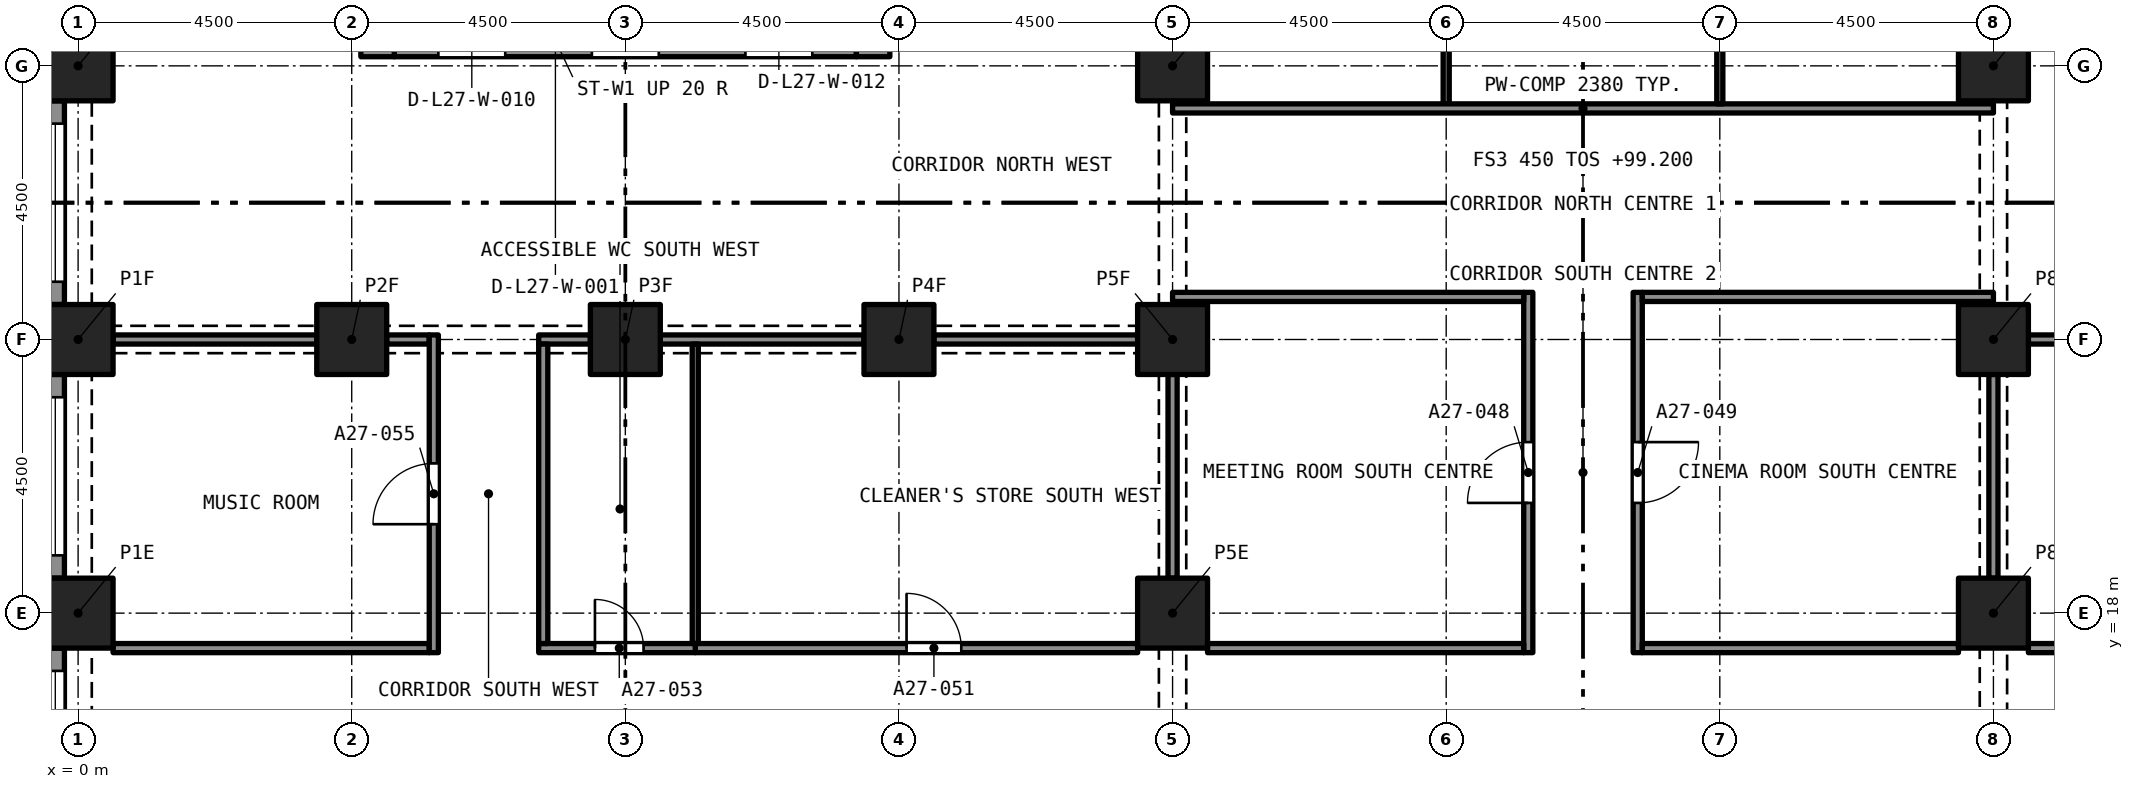
"""IFC4 building model, lengths in metres.
Left out: names, types, materials, properties, quantities, classifications, styles, units other than length and angle.
Written with IfcOpenShell. Run it as: python <this file> out.ifc"""

import sys

from ifc_helpers import new_model, si_unit, direction, frame, frame_2d, origin, origin_2d, place, context, subcontext, project, spatial, rectangle, extrude, element, fill, save


model = new_model("IFC4")
c1 = context("Model", 3, precision=1e-05, world=origin(), true_north=direction((0.0, 1.0)))
c2 = subcontext(c1, "Body", "Model", "MODEL_VIEW")
j1 = project(units=[si_unit("LENGTHUNIT", "METRE"), si_unit("PLANEANGLEUNIT", "RADIAN")], contexts=[c1])
p1 = place(None, origin())
s1 = spatial("IfcSite", under=j1, at=p1, CompositionType="ELEMENT")
p2 = place(p1, origin())
s2 = spatial("IfcBuilding", under=s1, at=p2, CompositionType="ELEMENT")
p3 = place(p2, frame((0.0, 0.0, 99.2)))
s3 = spatial("IfcBuildingStorey", under=s2, at=p3, CompositionType="ELEMENT", Elevation=99.2)
for number, where, z_axis, x_axis in (
    (1, (0.0, 18.0, 0.0), (0.0, 0.0, 1.0), (1.0, 0.0, 0.0)),
    (2, (18.0, 18.0, 0.0), (0.0, 0.0, 1.0), (1.0, 0.0, 0.0)),
    (3, (31.5, 18.0, 0.0), (0.0, 0.0, 1.0), (1.0, 0.0, 0.0)),
    (4, (0.0, 22.5, 0.0), (0.0, 0.0, 1.0), (1.0, 0.0, 0.0)),
    (5, (4.5, 22.5, 0.0), (0.0, 0.0, 1.0), (1.0, 0.0, 0.0)),
    (6, (9.0, 22.5, 0.0), (0.0, 0.0, 1.0), (1.0, 0.0, 0.0)),
    (7, (13.5, 22.5, 0.0), (0.0, 0.0, 1.0), (1.0, 0.0, 0.0)),
    (8, (18.0, 22.5, 0.0), (0.0, 0.0, 1.0), (1.0, 0.0, 0.0)),
    (9, (31.5, 22.5, 0.0), (0.0, 0.0, 1.0), (1.0, 0.0, 0.0)),
    (10, (0.0, 27.0, 0.0), (0.0, 0.0, 1.0), (1.0, 0.0, 0.0)),
    (11, (18.0, 27.0, 0.0), (0.0, 0.0, 1.0), (1.0, 0.0, 0.0)),
    (12, (31.5, 27.0, 0.0), (0.0, 0.0, 1.0), (1.0, 0.0, 0.0)),
):
    element("IfcColumn", number, at=place(p3, frame(where, z_axis=z_axis, x_axis=x_axis)), inside=s3, PredefinedType="COLUMN", context=c2, shape_type="SweptSolid", body=[
        extrude(rectangle(XDim=1.15, YDim=1.15, at=origin_2d()), origin(), (0.0, 0.0, 1.0), 3.2),
    ])
p4 = place(p3, frame((5.2, 27.425, 0.0), z_axis=(0.0, 0.0, 1.0), x_axis=(1.0, 0.0, 0.0)))
e13 = element("IfcWall", 13, at=p4, inside=s3, PredefinedType="SOLIDWALL", context=c2, shape_type="SweptSolid", body=[
    extrude(rectangle(XDim=7.6, YDim=0.55, at=frame_2d((3.8, 0.0))), origin(), (0.0, 0.0, 1.0), 3.2),
])
p5 = place(p4, frame((0.725, 0.0, 0.0)))
e14 = element("IfcOpeningElement", 14, at=p5, cuts=e13, PredefinedType="OPENING", context=c2, shape_type="SweptSolid", body=[
    extrude(rectangle(XDim=1.1, YDim=2.1, at=frame_2d((0.55, 1.05))), frame((0.0, 0.285, 0.0), z_axis=(0.0, -1.0, 0.0), x_axis=(1.0, 0.0, 0.0)), (0.0, 0.0, 1.0), 0.57),
])
p6 = place(p4, frame((3.25, 0.0, 0.0)))
e15 = element("IfcOpeningElement", 15, at=p6, cuts=e13, PredefinedType="OPENING", context=c2, shape_type="SweptSolid", body=[
    extrude(rectangle(XDim=1.1, YDim=2.1, at=frame_2d((0.55, 1.05))), frame((0.0, 0.285, 0.0), z_axis=(0.0, -1.0, 0.0), x_axis=(1.0, 0.0, 0.0)), (0.0, 0.0, 1.0), 0.57),
])
p7 = place(p4, frame((5.775, 0.0, 0.0)))
e16 = element("IfcOpeningElement", 16, at=p7, cuts=e13, PredefinedType="OPENING", context=c2, shape_type="SweptSolid", body=[
    extrude(rectangle(XDim=1.1, YDim=2.1, at=frame_2d((0.55, 1.05))), frame((0.0, 0.285, 0.0), z_axis=(0.0, -1.0, 0.0), x_axis=(1.0, 0.0, 0.0)), (0.0, 0.0, 1.0), 0.57),
])
p8 = place(p3, frame((4.925, 27.15, 0.0), z_axis=(0.0, 0.0, 1.0), x_axis=(0.0, 1.0, 0.0)))
e17 = element("IfcWall", 17, at=p8, inside=s3, PredefinedType="SOLIDWALL", context=c2, shape_type="SweptSolid", body=[
    extrude(rectangle(XDim=13.2, YDim=0.55, at=frame_2d((6.6, 0.0))), origin(), (0.0, 0.0, 1.0), 3.2),
])
p9 = place(p8, frame((8.8, 0.0, 0.0)))
e18 = element("IfcOpeningElement", 18, at=p9, cuts=e17, PredefinedType="OPENING", context=c2, shape_type="SweptSolid", body=[
    extrude(rectangle(XDim=1.2, YDim=2.1, at=frame_2d((0.6, 1.05))), frame((0.0, 0.285, 0.0), z_axis=(0.0, -1.0, 0.0), x_axis=(1.0, 0.0, 0.0)), (0.0, 0.0, 1.0), 0.57),
])
p10 = place(p3, frame((13.075, 27.15, 0.0), z_axis=(0.0, 0.0, 1.0), x_axis=(0.0, 1.0, 0.0)))
e19 = element("IfcWall", 19, at=p10, inside=s3, PredefinedType="SOLIDWALL", context=c2, shape_type="SweptSolid", body=[
    extrude(rectangle(XDim=13.2, YDim=0.55, at=frame_2d((6.6, 0.0))), origin(), (0.0, 0.0, 1.0), 3.2),
])
p11 = place(p10, frame((10.95, 0.0, 0.0)))
e20 = element("IfcOpeningElement", 20, at=p11, cuts=e19, PredefinedType="OPENING", context=c2, shape_type="SweptSolid", body=[
    extrude(rectangle(XDim=1.1, YDim=2.1, at=frame_2d((0.55, 1.05))), frame((0.0, 0.285, 0.0), z_axis=(0.0, -1.0, 0.0), x_axis=(1.0, 0.0, 0.0)), (0.0, 0.0, 1.0), 0.57),
])
p12 = place(p10, frame((8.8, 0.0, 0.0)))
e21 = element("IfcOpeningElement", 21, at=p12, cuts=e19, PredefinedType="OPENING", context=c2, shape_type="SweptSolid", body=[
    extrude(rectangle(XDim=1.2, YDim=2.1, at=frame_2d((0.6, 1.05))), frame((0.0, 0.285, 0.0), z_axis=(0.0, -1.0, 0.0), x_axis=(1.0, 0.0, 0.0)), (0.0, 0.0, 1.0), 0.57),
])
p13 = place(p3, frame((-0.375, 23.075, 0.0), z_axis=(0.0, 0.0, 1.0), x_axis=(0.0, 1.0, 0.0)))
e22 = element("IfcWall", 22, at=p13, inside=s3, PredefinedType="SOLIDWALL", context=c2, shape_type="SweptSolid", body=[
    extrude(rectangle(XDim=3.35, YDim=0.3, at=frame_2d((1.675, 0.0))), origin(), (0.0, 0.0, 1.0), 3.2),
])
p14 = place(p13, frame((0.375, 0.0, 0.45)))
e23 = element("IfcOpeningElement", 23, at=p14, cuts=e22, PredefinedType="OPENING", context=c2, shape_type="SweptSolid", body=[
    extrude(rectangle(XDim=2.6, YDim=1.95, at=frame_2d((1.3, 0.975))), frame((0.0, 0.16, 0.0), z_axis=(0.0, -1.0, 0.0), x_axis=(1.0, 0.0, 0.0)), (0.0, 0.0, 1.0), 0.32),
])
p15 = place(p3, frame((-0.375, 18.575, 0.0), z_axis=(0.0, 0.0, 1.0), x_axis=(0.0, 1.0, 0.0)))
e24 = element("IfcWall", 24, at=p15, inside=s3, PredefinedType="SOLIDWALL", context=c2, shape_type="SweptSolid", body=[
    extrude(rectangle(XDim=3.35, YDim=0.3, at=frame_2d((1.675, 0.0))), origin(), (0.0, 0.0, 1.0), 3.2),
])
p16 = place(p15, frame((0.375, 0.0, 0.45)))
e25 = element("IfcOpeningElement", 25, at=p16, cuts=e24, PredefinedType="OPENING", context=c2, shape_type="SweptSolid", body=[
    extrude(rectangle(XDim=2.6, YDim=1.95, at=frame_2d((1.3, 0.975))), frame((0.0, 0.16, 0.0), z_axis=(0.0, -1.0, 0.0), x_axis=(1.0, 0.0, 0.0)), (0.0, 0.0, 1.0), 0.32),
])
p17 = place(p3, frame((-0.375, 14.075, 0.0), z_axis=(0.0, 0.0, 1.0), x_axis=(0.0, 1.0, 0.0)))
e26 = element("IfcWall", 26, at=p17, inside=s3, PredefinedType="SOLIDWALL", context=c2, shape_type="SweptSolid", body=[
    extrude(rectangle(XDim=3.35, YDim=0.3, at=frame_2d((1.675, 0.0))), origin(), (0.0, 0.0, 1.0), 3.2),
])
p18 = place(p17, frame((0.375, 0.0, 0.45)))
e27 = element("IfcOpeningElement", 27, at=p18, cuts=e26, PredefinedType="OPENING", context=c2, shape_type="SweptSolid", body=[
    extrude(rectangle(XDim=2.6, YDim=1.95, at=frame_2d((1.3, 0.975))), frame((0.0, 0.16, 0.0), z_axis=(0.0, -1.0, 0.0), x_axis=(1.0, 0.0, 0.0)), (0.0, 0.0, 1.0), 0.32),
])
p19 = place(p3, frame((23.85, 17.35, 0.0), z_axis=(0.0, 0.0, 1.0), x_axis=(0.0, 1.0, 0.0)))
e28 = element("IfcWall", 28, at=p19, inside=s3, PredefinedType="PARTITIONING", context=c2, shape_type="SweptSolid", body=[
    extrude(rectangle(XDim=5.925, YDim=0.15, at=frame_2d((2.962, 0.0))), origin(), (0.0, 0.0, 1.0), 2.75),
])
p20 = place(p19, frame((2.462, 0.0, 0.0)))
e29 = element("IfcOpeningElement", 29, at=p20, cuts=e28, PredefinedType="OPENING", context=c2, shape_type="SweptSolid", body=[
    extrude(rectangle(XDim=1.0, YDim=2.1, at=frame_2d((0.5, 1.05))), frame((0.0, 0.085, 0.0), z_axis=(0.0, -1.0, 0.0), x_axis=(1.0, 0.0, 0.0)), (0.0, 0.0, 1.0), 0.17),
])
p21 = place(p3, frame((25.65, 23.275, 0.0), z_axis=(0.0, 0.0, 1.0), x_axis=(0.0, -1.0, 0.0)))
e30 = element("IfcWall", 30, at=p21, inside=s3, PredefinedType="PARTITIONING", context=c2, shape_type="SweptSolid", body=[
    extrude(rectangle(XDim=5.925, YDim=0.15, at=frame_2d((2.962, 0.0))), origin(), (0.0, 0.0, 1.0), 2.75),
])
p22 = place(p21, frame((2.462, 0.0, 0.0)))
e31 = element("IfcOpeningElement", 31, at=p22, cuts=e30, PredefinedType="OPENING", context=c2, shape_type="SweptSolid", body=[
    extrude(rectangle(XDim=1.0, YDim=2.1, at=frame_2d((0.5, 1.05))), frame((0.0, 0.085, 0.0), z_axis=(0.0, -1.0, 0.0), x_axis=(1.0, 0.0, 0.0)), (0.0, 0.0, 1.0), 0.17),
])
for number, where, z_axis, x_axis in (
    (32, (18.575, 17.425, 0.0), (0.0, 0.0, 1.0), (1.0, 0.0, 0.0)),
    (33, (25.725, 17.425, 0.0), (0.0, 0.0, 1.0), (1.0, 0.0, 0.0)),
):
    element("IfcWall", number, at=place(p3, frame(where, z_axis=z_axis, x_axis=x_axis)), inside=s3, PredefinedType="PARTITIONING", context=c2, shape_type="SweptSolid", body=[
        extrude(rectangle(XDim=5.2, YDim=0.15, at=frame_2d((2.6, 0.0))), origin(), (0.0, 0.0, 1.0), 2.75),
    ])
p23 = place(p3, frame((32.075, 17.425, 0.0), z_axis=(0.0, 0.0, 1.0), x_axis=(1.0, 0.0, 0.0)))
e34 = element("IfcWall", 34, at=p23, inside=s3, PredefinedType="PARTITIONING", context=c2, shape_type="SweptSolid", body=[
    extrude(rectangle(XDim=7.275, YDim=0.15, at=frame_2d((3.638, 0.0))), origin(), (0.0, 0.0, 1.0), 2.9),
])
p24 = place(p23, frame((2.9, 0.0, 0.0)))
e35 = element("IfcOpeningElement", 35, at=p24, cuts=e34, PredefinedType="OPENING", context=c2, shape_type="SweptSolid", body=[
    extrude(rectangle(XDim=0.9, YDim=2.1, at=frame_2d((0.45, 1.05))), frame((0.0, 0.085, 0.0), z_axis=(0.0, -1.0, 0.0), x_axis=(1.0, 0.0, 0.0)), (0.0, 0.0, 1.0), 0.17),
])
p25 = place(p3, frame((10.15, 17.425, 0.0), z_axis=(0.0, 0.0, 1.0), x_axis=(1.0, 0.0, 0.0)))
e36 = element("IfcWall", 36, at=p25, inside=s3, PredefinedType="PARTITIONING", context=c2, shape_type="SweptSolid", body=[
    extrude(rectangle(XDim=7.275, YDim=0.15, at=frame_2d((3.638, 0.0))), origin(), (0.0, 0.0, 1.0), 2.9),
])
p26 = place(p25, frame((3.475, 0.0, 0.0)))
e37 = element("IfcOpeningElement", 37, at=p26, cuts=e36, PredefinedType="OPENING", context=c2, shape_type="SweptSolid", body=[
    extrude(rectangle(XDim=0.9, YDim=2.1, at=frame_2d((0.45, 1.05))), frame((0.0, 0.085, 0.0), z_axis=(0.0, -1.0, 0.0), x_axis=(1.0, 0.0, 0.0)), (0.0, 0.0, 1.0), 0.17),
])
p27 = place(p3, frame((7.575, 17.425, 0.0), z_axis=(0.0, 0.0, 1.0), x_axis=(1.0, 0.0, 0.0)))
e38 = element("IfcWall", 38, at=p27, inside=s3, PredefinedType="PARTITIONING", context=c2, shape_type="SweptSolid", body=[
    extrude(rectangle(XDim=2.575, YDim=0.15, at=frame_2d((1.288, 0.0))), origin(), (0.0, 0.0, 1.0), 2.9),
])
p28 = place(p27, frame((0.925, 0.0, 0.0)))
e39 = element("IfcOpeningElement", 39, at=p28, cuts=e38, PredefinedType="OPENING", context=c2, shape_type="SweptSolid", body=[
    extrude(rectangle(XDim=0.8, YDim=2.1, at=frame_2d((0.4, 1.05))), frame((0.0, 0.085, 0.0), z_axis=(0.0, -1.0, 0.0), x_axis=(1.0, 0.0, 0.0)), (0.0, 0.0, 1.0), 0.17),
])
p29 = place(p3, frame((0.575, 17.425, 0.0), z_axis=(0.0, 0.0, 1.0), x_axis=(1.0, 0.0, 0.0)))
e40 = element("IfcWall", 40, at=p29, inside=s3, PredefinedType="PARTITIONING", context=c2, shape_type="SweptSolid", body=[
    extrude(rectangle(XDim=5.2, YDim=0.15, at=frame_2d((2.6, 0.0))), origin(), (0.0, 0.0, 1.0), 2.9),
])
p30 = place(p3, frame((22.5, 26.375, 0.0), z_axis=(0.0, 0.0, 1.0), x_axis=(0.0, 1.0, 0.0)))
e41 = element("IfcWall", 41, at=p30, inside=s3, PredefinedType="PARTITIONING", context=c2, shape_type="SweptSolid", body=[
    extrude(rectangle(XDim=10.125, YDim=0.1, at=frame_2d((5.062, 0.0))), origin(), (0.0, 0.0, 1.0), 2.75),
])
p31 = place(p3, frame((18.0, 26.3, 0.0), z_axis=(0.0, 0.0, 1.0), x_axis=(1.0, 0.0, 0.0)))
e42 = element("IfcWall", 42, at=p31, inside=s3, PredefinedType="PARTITIONING", context=c2, shape_type="SweptSolid", body=[
    extrude(rectangle(XDim=13.5, YDim=0.15, at=frame_2d((6.75, 0.0))), origin(), (0.0, 0.0, 1.0), 2.38),
])
p32 = place(p3, frame((27.0, 26.375, 0.0), z_axis=(0.0, 0.0, 1.0), x_axis=(0.0, 1.0, 0.0)))
e43 = element("IfcWall", 43, at=p32, inside=s3, PredefinedType="PARTITIONING", context=c2, shape_type="SweptSolid", body=[
    extrude(rectangle(XDim=10.125, YDim=0.1, at=frame_2d((5.062, 0.0))), origin(), (0.0, 0.0, 1.0), 2.75),
])
p33 = place(p3, frame((18.0, 23.2, 0.0), z_axis=(0.0, 0.0, 1.0), x_axis=(1.0, 0.0, 0.0)))
e44 = element("IfcWall", 44, at=p33, inside=s3, PredefinedType="PARTITIONING", context=c2, shape_type="SweptSolid", body=[
    extrude(rectangle(XDim=5.775, YDim=0.15, at=frame_2d((2.887, 0.0))), origin(), (0.0, 0.0, 1.0), 2.75),
])
p34 = place(p3, frame((18.0, 18.575, 0.0), z_axis=(0.0, 0.0, 1.0), x_axis=(0.0, 1.0, 0.0)))
e45 = element("IfcWall", 45, at=p34, inside=s3, PredefinedType="PARTITIONING", context=c2, shape_type="SweptSolid", body=[
    extrude(rectangle(XDim=3.35, YDim=0.15, at=frame_2d((1.675, 0.0))), origin(), (0.0, 0.0, 1.0), 2.38),
])
p35 = place(p3, frame((25.725, 23.2, 0.0), z_axis=(0.0, 0.0, 1.0), x_axis=(1.0, 0.0, 0.0)))
e46 = element("IfcWall", 46, at=p35, inside=s3, PredefinedType="PARTITIONING", context=c2, shape_type="SweptSolid", body=[
    extrude(rectangle(XDim=5.775, YDim=0.15, at=frame_2d((2.887, 0.0))), origin(), (0.0, 0.0, 1.0), 2.75),
])
p36 = place(p3, frame((31.5, 18.575, 0.0), z_axis=(0.0, 0.0, 1.0), x_axis=(0.0, 1.0, 0.0)))
e47 = element("IfcWall", 47, at=p36, inside=s3, PredefinedType="PARTITIONING", context=c2, shape_type="SweptSolid", body=[
    extrude(rectangle(XDim=3.35, YDim=0.15, at=frame_2d((1.675, 0.0))), origin(), (0.0, 0.0, 1.0), 2.38),
])
p37 = place(p3, frame((32.075, 22.5, 0.0), z_axis=(0.0, 0.0, 1.0), x_axis=(1.0, 0.0, 0.0)))
e48 = element("IfcWall", 48, at=p37, inside=s3, PredefinedType="PARTITIONING", context=c2, shape_type="SweptSolid", body=[
    extrude(rectangle(XDim=9.85, YDim=0.15, at=frame_2d((4.925, 0.0))), origin(), (0.0, 0.0, 1.0), 2.9),
])
for number, where, z_axis, x_axis in (
    (49, (14.075, 22.5, 0.0), (0.0, 0.0, 1.0), (1.0, 0.0, 0.0)),
    (50, (9.575, 22.5, 0.0), (0.0, 0.0, 1.0), (1.0, 0.0, 0.0)),
):
    element("IfcWall", number, at=place(p3, frame(where, z_axis=z_axis, x_axis=x_axis)), inside=s3, PredefinedType="PARTITIONING", context=c2, shape_type="SweptSolid", body=[
        extrude(rectangle(XDim=3.35, YDim=0.15, at=frame_2d((1.675, 0.0))), origin(), (0.0, 0.0, 1.0), 2.38),
    ])
p38 = place(p3, frame((7.575, 22.5, 0.0), z_axis=(0.0, 0.0, 1.0), x_axis=(1.0, 0.0, 0.0)))
e51 = element("IfcWall", 51, at=p38, inside=s3, PredefinedType="PARTITIONING", context=c2, shape_type="SweptSolid", body=[
    extrude(rectangle(XDim=0.85, YDim=0.15, at=frame_2d((0.425, 0.0))), origin(), (0.0, 0.0, 1.0), 2.38),
])
p39 = place(p3, frame((5.075, 22.5, 0.0), z_axis=(0.0, 0.0, 1.0), x_axis=(1.0, 0.0, 0.0)))
e52 = element("IfcWall", 52, at=p39, inside=s3, PredefinedType="PARTITIONING", context=c2, shape_type="SweptSolid", body=[
    extrude(rectangle(XDim=0.7, YDim=0.15, at=frame_2d((0.35, 0.0))), origin(), (0.0, 0.0, 1.0), 2.38),
])
p40 = place(p3, frame((0.575, 22.5, 0.0), z_axis=(0.0, 0.0, 1.0), x_axis=(1.0, 0.0, 0.0)))
e53 = element("IfcWall", 53, at=p40, inside=s3, PredefinedType="PARTITIONING", context=c2, shape_type="SweptSolid", body=[
    extrude(rectangle(XDim=3.35, YDim=0.15, at=frame_2d((1.675, 0.0))), origin(), (0.0, 0.0, 1.0), 2.38),
])
p41 = place(p3, frame((7.65, 17.5, 0.0), z_axis=(0.0, 0.0, 1.0), x_axis=(0.0, 1.0, 0.0)))
e54 = element("IfcWall", 54, at=p41, inside=s3, PredefinedType="PARTITIONING", context=c2, shape_type="SweptSolid", body=[
    extrude(rectangle(XDim=4.925, YDim=0.15, at=frame_2d((2.462, 0.0))), origin(), (0.0, 0.0, 1.0), 2.9),
])
p42 = place(p3, frame((5.85, 17.35, 0.0), z_axis=(0.0, 0.0, 1.0), x_axis=(0.0, 1.0, 0.0)))
e55 = element("IfcWall", 55, at=p42, inside=s3, PredefinedType="PARTITIONING", context=c2, shape_type="SweptSolid", body=[
    extrude(rectangle(XDim=5.225, YDim=0.15, at=frame_2d((2.612, 0.0))), origin(), (0.0, 0.0, 1.0), 2.9),
])
p43 = place(p42, frame((2.113, 0.0, 0.0)))
e56 = element("IfcOpeningElement", 56, at=p43, cuts=e55, PredefinedType="OPENING", context=c2, shape_type="SweptSolid", body=[
    extrude(rectangle(XDim=1.0, YDim=2.1, at=frame_2d((0.5, 1.05))), frame((0.0, 0.085, 0.0), z_axis=(0.0, -1.0, 0.0), x_axis=(1.0, 0.0, 0.0)), (0.0, 0.0, 1.0), 0.17),
])
p44 = place(p3, frame((10.15, 17.5, 0.0), z_axis=(0.0, 0.0, 1.0), x_axis=(0.0, 1.0, 0.0)))
e57 = element("IfcWall", 57, at=p44, inside=s3, PredefinedType="PARTITIONING", context=c2, shape_type="SweptSolid", body=[
    extrude(rectangle(XDim=4.925, YDim=0.1, at=frame_2d((2.462, 0.0))), origin(), (0.0, 0.0, 1.0), 2.9),
])
p45 = place(p14, origin())
e58 = element("IfcWindow", 58, at=p45, inside=s3, PartitioningType="SINGLE_PANEL", PredefinedType="WINDOW", context=c2, shape_type="SweptSolid", body=[
    extrude(rectangle(XDim=2.6, YDim=1.95, at=frame_2d((1.3, 0.975))), frame((0.0, 0.03, 0.0), z_axis=(0.0, -1.0, 0.0), x_axis=(1.0, 0.0, 0.0)), (0.0, 0.0, 1.0), 0.06),
])
fill(e23, e58)
p46 = place(p16, origin())
e59 = element("IfcWindow", 59, at=p46, inside=s3, PartitioningType="SINGLE_PANEL", PredefinedType="WINDOW", context=c2, shape_type="SweptSolid", body=[
    extrude(rectangle(XDim=2.6, YDim=1.95, at=frame_2d((1.3, 0.975))), frame((0.0, 0.03, 0.0), z_axis=(0.0, -1.0, 0.0), x_axis=(1.0, 0.0, 0.0)), (0.0, 0.0, 1.0), 0.06),
])
fill(e25, e59)
p47 = place(p18, origin())
e60 = element("IfcWindow", 60, at=p47, inside=s3, PartitioningType="SINGLE_PANEL", PredefinedType="WINDOW", context=c2, shape_type="SweptSolid", body=[
    extrude(rectangle(XDim=2.6, YDim=1.95, at=frame_2d((1.3, 0.975))), frame((0.0, 0.03, 0.0), z_axis=(0.0, -1.0, 0.0), x_axis=(1.0, 0.0, 0.0)), (0.0, 0.0, 1.0), 0.06),
])
fill(e27, e60)
p48 = place(p20, origin())
e61 = element("IfcDoor", 61, at=p48, inside=s3, OperationType="SINGLE_SWING_RIGHT", PredefinedType="DOOR", context=c2, shape_type="SweptSolid", body=[
    extrude(rectangle(XDim=1.0, YDim=2.1, at=frame_2d((0.5, 1.05))), frame((0.0, 0.025, 0.0), z_axis=(0.0, -1.0, 0.0), x_axis=(1.0, 0.0, 0.0)), (0.0, 0.0, 1.0), 0.05),
])
fill(e29, e61)
p49 = place(p22, origin())
e62 = element("IfcDoor", 62, at=p49, inside=s3, OperationType="SINGLE_SWING_RIGHT", PredefinedType="DOOR", context=c2, shape_type="SweptSolid", body=[
    extrude(rectangle(XDim=1.0, YDim=2.1, at=frame_2d((0.5, 1.05))), frame((0.0, 0.025, 0.0), z_axis=(0.0, -1.0, 0.0), x_axis=(1.0, 0.0, 0.0)), (0.0, 0.0, 1.0), 0.05),
])
fill(e31, e62)
p50 = place(p26, origin())
e63 = element("IfcDoor", 63, at=p50, inside=s3, OperationType="SINGLE_SWING_RIGHT", PredefinedType="DOOR", context=c2, shape_type="SweptSolid", body=[
    extrude(rectangle(XDim=0.9, YDim=2.1, at=frame_2d((0.45, 1.05))), frame((0.0, 0.025, 0.0), z_axis=(0.0, -1.0, 0.0), x_axis=(1.0, 0.0, 0.0)), (0.0, 0.0, 1.0), 0.05),
])
fill(e37, e63)
p51 = place(p28, origin())
e64 = element("IfcDoor", 64, at=p51, inside=s3, OperationType="SINGLE_SWING_RIGHT", PredefinedType="DOOR", context=c2, shape_type="SweptSolid", body=[
    extrude(rectangle(XDim=0.8, YDim=2.1, at=frame_2d((0.4, 1.05))), frame((0.0, 0.025, 0.0), z_axis=(0.0, -1.0, 0.0), x_axis=(1.0, 0.0, 0.0)), (0.0, 0.0, 1.0), 0.05),
])
fill(e39, e64)
p52 = place(p43, origin())
e65 = element("IfcDoor", 65, at=p52, inside=s3, OperationType="SINGLE_SWING_LEFT", PredefinedType="DOOR", context=c2, shape_type="SweptSolid", body=[
    extrude(rectangle(XDim=1.0, YDim=2.1, at=frame_2d((0.5, 1.05))), frame((0.0, 0.025, 0.0), z_axis=(0.0, -1.0, 0.0), x_axis=(1.0, 0.0, 0.0)), (0.0, 0.0, 1.0), 0.05),
])
fill(e56, e65)
save(model, sys.argv[1])
